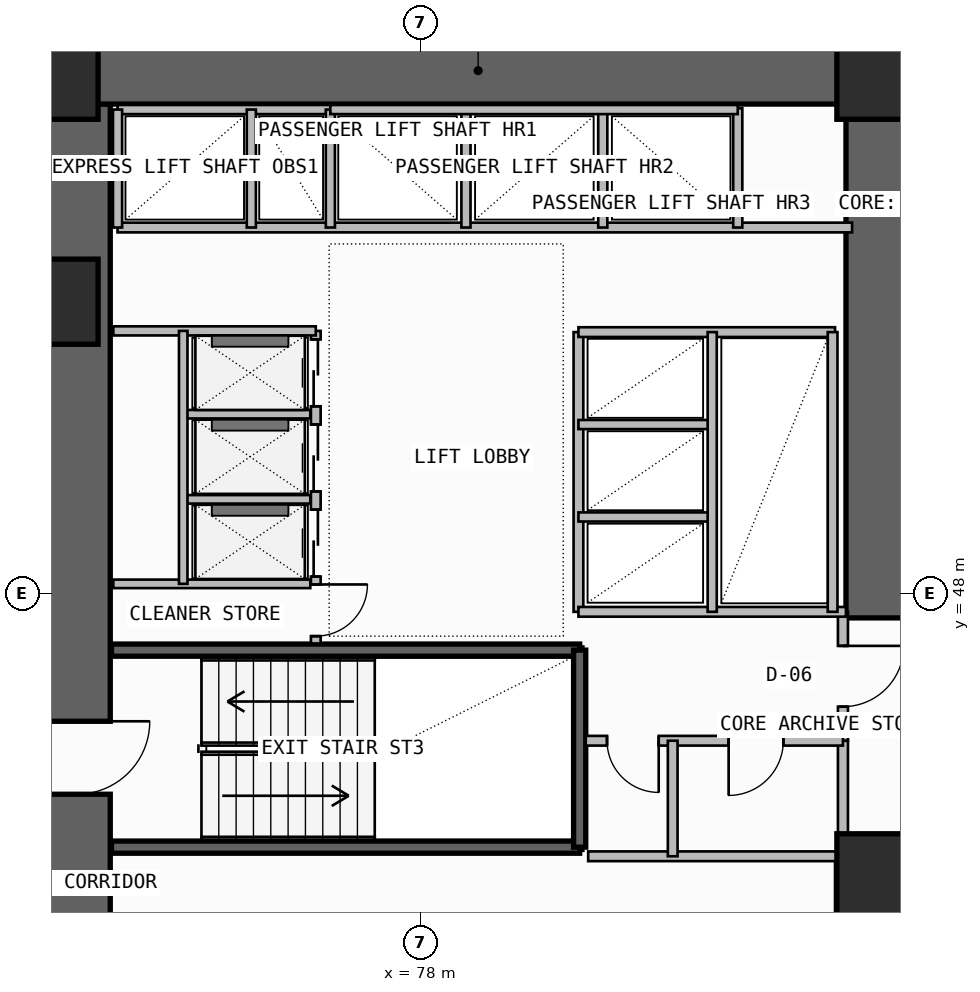
"""IFC4 building model, lengths in metres.
Left out: names, types, materials, properties, quantities, classifications, styles, units other than length and angle.
Written with IfcOpenShell. Run it as: python <this file> out.ifc"""

import sys

from ifc_helpers import new_model, si_unit, direction, frame, frame_2d, origin, origin_2d, place, context, subcontext, project, spatial, rectangle, extrude, element, fill, save


model = new_model("IFC4")
c1 = context("Model", 3, precision=1e-05, world=origin(), true_north=direction((0.0, 1.0)))
c2 = subcontext(c1, "Body", "Model", "MODEL_VIEW")
j1 = project(units=[si_unit("LENGTHUNIT", "METRE"), si_unit("PLANEANGLEUNIT", "RADIAN")], contexts=[c1])
p1 = place(None, origin())
s1 = spatial("IfcSite", under=j1, at=p1, CompositionType="ELEMENT")
p2 = place(p1, origin())
s2 = spatial("IfcBuilding", under=s1, at=p2, CompositionType="ELEMENT")
p3 = place(p2, frame((0.0, 0.0, 30.3)))
s3 = spatial("IfcBuildingStorey", under=s2, at=p3, CompositionType="ELEMENT", Elevation=30.3)
p4 = place(p3, frame((72.35, 35.5, -0.2), z_axis=(0.0, 0.0, 1.0), x_axis=(0.0, 1.0, 0.0)))
e1 = element("IfcWall", 1, at=p4, inside=s3, PredefinedType="SHEAR", context=c2, shape_type="SweptSolid", body=[
    extrude(rectangle(XDim=7.85, YDim=1.1, at=frame_2d((3.925, 0.0))), origin(), (0.0, 0.0, 1.0), 3.6),
])
p5 = place(p4, frame((1.45, 0.0, 0.2)))
e2 = element("IfcOpeningElement", 2, at=p5, cuts=e1, PredefinedType="OPENING", context=c2, shape_type="SweptSolid", body=[
    extrude(rectangle(XDim=1.2, YDim=2.2, at=frame_2d((0.6, 1.1))), frame((0.0, 0.56, 0.0), z_axis=(0.0, -1.0, 0.0), x_axis=(1.0, 0.0, 0.0)), (0.0, 0.0, 1.0), 1.12),
])
p6 = place(p3, frame((72.35, 43.35, -0.2), z_axis=(0.0, 0.0, 1.0), x_axis=(0.0, 1.0, 0.0)))
e3 = element("IfcWall", 3, at=p6, inside=s3, PredefinedType="SHEAR", context=c2, shape_type="SweptSolid", body=[
    extrude(rectangle(XDim=12.7, YDim=1.1, at=frame_2d((6.35, 0.0))), origin(), (0.0, 0.0, 1.0), 3.6),
])
p7 = place(p6, frame((1.35, 0.0, 0.2)))
e4 = element("IfcOpeningElement", 4, at=p7, cuts=e3, PredefinedType="OPENING", context=c2, shape_type="SweptSolid", body=[
    extrude(rectangle(XDim=1.2, YDim=2.2, at=frame_2d((0.6, 1.1))), frame((0.0, 0.56, 0.0), z_axis=(0.0, -1.0, 0.0), x_axis=(1.0, 0.0, 0.0)), (0.0, 0.0, 1.0), 1.12),
])
p8 = place(p3, frame((71.8, 56.6, -0.2), z_axis=(0.0, 0.0, 1.0), x_axis=(1.0, 0.0, 0.0)))
e5 = element("IfcWall", 5, at=p8, inside=s3, PredefinedType="SHEAR", context=c2, shape_type="SweptSolid", body=[
    extrude(rectangle(XDim=14.3, YDim=1.1, at=frame_2d((7.15, 0.0))), origin(), (0.0, 0.0, 1.0), 3.6),
])
p9 = place(p3, frame((85.55, 47.6, -0.2), z_axis=(0.0, 0.0, 1.0), x_axis=(0.0, 1.0, 0.0)))
e6 = element("IfcWall", 6, at=p9, inside=s3, PredefinedType="SHEAR", context=c2, shape_type="SweptSolid", body=[
    extrude(rectangle(XDim=8.45, YDim=1.1, at=frame_2d((4.225, 0.0))), origin(), (0.0, 0.0, 1.0), 3.6),
])
for number, where, z_axis, x_axis in (
    (7, (85.55, 43.35, 0.0), (0.0, 0.0, 1.0), (1.0, 0.0, 0.0)),
    (8, (72.0, 52.8, 0.0), (0.0, 0.0, 1.0), (1.0, 0.0, 0.0)),
    (9, (72.0, 56.5, 0.0), (0.0, 0.0, 1.0), (1.0, 0.0, 0.0)),
    (10, (85.55, 56.5, 0.0), (0.0, 0.0, 1.0), (1.0, 0.0, 0.0)),
):
    element("IfcColumn", number, at=place(p3, frame(where, z_axis=z_axis, x_axis=x_axis)), inside=s3, PredefinedType="COLUMN", context=c2, shape_type="SweptSolid", body=[
        extrude(rectangle(XDim=1.4, YDim=1.4, at=origin_2d()), origin(), (0.0, 0.0, 1.0), 3.6),
    ])
p10 = place(p3, frame((84.92, 38.85, 0.0), z_axis=(0.0, 0.0, 1.0), x_axis=(0.0, 1.0, 0.0)))
e11 = element("IfcWall", 11, at=p10, inside=s3, PredefinedType="SOLIDWALL", context=c2, shape_type="SweptSolid", body=[
    extrude(rectangle(XDim=4.83, YDim=0.2, at=frame_2d((2.415, 0.0))), origin(), (0.0, 0.0, 1.0), 3.4),
])
p11 = place(p10, frame((1.25, 0.0, 0.0)))
e12 = element("IfcOpeningElement", 12, at=p11, cuts=e11, PredefinedType="OPENING", context=c2, shape_type="SweptSolid", body=[
    extrude(rectangle(XDim=1.1, YDim=2.2, at=frame_2d((0.55, 1.1))), frame((0.0, 0.11, 0.0), z_axis=(0.0, -1.0, 0.0), x_axis=(1.0, 0.0, 0.0)), (0.0, 0.0, 1.0), 0.22),
])
for number, where, z_axis, x_axis in (
    (13, (72.92, 43.83, -0.2), (0.0, 0.0, 1.0), (1.0, 0.0, 0.0)),
    (14, (72.92, 47.07, -0.2), (0.0, 0.0, 1.0), (1.0, 0.0, 0.0)),
):
    element("IfcWall", number, at=place(p3, frame(where, z_axis=z_axis, x_axis=x_axis)), inside=s3, PredefinedType="SOLIDWALL", context=c2, shape_type="SweptSolid", body=[
        extrude(rectangle(XDim=7.7, YDim=0.2, at=frame_2d((3.85, 0.0))), origin(), (0.0, 0.0, 1.0), 3.6),
    ])
p12 = place(p3, frame((80.62, 43.83, -0.2), z_axis=(0.0, 0.0, 1.0), x_axis=(0.0, 1.0, 0.0)))
e15 = element("IfcWall", 15, at=p12, inside=s3, PredefinedType="SOLIDWALL", context=c2, shape_type="SweptSolid", body=[
    extrude(rectangle(XDim=3.24, YDim=0.2, at=frame_2d((1.62, 0.0))), origin(), (0.0, 0.0, 1.0), 3.6),
])
p13 = place(p3, frame((84.95, 43.68, 0.0), z_axis=(0.0, 0.0, 1.0), x_axis=(0.0, 1.0, 0.0)))
e16 = element("IfcWall", 16, at=p13, inside=s3, PredefinedType="PLUMBINGWALL", context=c2, shape_type="SweptSolid", body=[
    extrude(rectangle(XDim=1.9, YDim=0.165, at=frame_2d((0.95, 0.0))), origin(), (0.0, 0.0, 1.0), 3.4),
])
p14 = place(p3, frame((84.95, 45.58, 0.0), z_axis=(0.0, 0.0, 1.0), x_axis=(0.0, 1.0, 0.0)))
e17 = element("IfcWall", 17, at=p14, inside=s3, PredefinedType="PARTITIONING", context=c2, shape_type="SweptSolid", body=[
    extrude(rectangle(XDim=2.12, YDim=0.165, at=frame_2d((1.06, 0.0))), origin(), (0.0, 0.0, 1.0), 3.4),
])
p15 = place(p14, frame((0.56, 0.0, 0.0)))
e18 = element("IfcOpeningElement", 18, at=p15, cuts=e17, PredefinedType="OPENING", context=c2, shape_type="SweptSolid", body=[
    extrude(rectangle(XDim=1.0, YDim=2.2, at=frame_2d((0.5, 1.1))), frame((0.0, 0.093, 0.0), z_axis=(0.0, -1.0, 0.0), x_axis=(1.0, 0.0, 0.0)), (0.0, 0.0, 1.0), 0.185),
])
p16 = place(p3, frame((80.72, 45.58, 0.0), z_axis=(0.0, 0.0, 1.0), x_axis=(1.0, 0.0, 0.0)))
e19 = element("IfcWall", 19, at=p16, inside=s3, PredefinedType="PLUMBINGWALL", context=c2, shape_type="SweptSolid", body=[
    extrude(rectangle(XDim=4.23, YDim=0.16, at=frame_2d((2.115, 0.0))), origin(), (0.0, 0.0, 1.0), 3.4),
])
p17 = place(p16, frame((0.35, 0.0, 0.0)))
e20 = element("IfcOpeningElement", 20, at=p17, cuts=e19, PredefinedType="OPENING", context=c2, shape_type="SweptSolid", body=[
    extrude(rectangle(XDim=0.85, YDim=2.05, at=frame_2d((0.425, 1.025))), frame((0.0, 0.09, 0.0), z_axis=(0.0, -1.0, 0.0), x_axis=(1.0, 0.0, 0.0)), (0.0, 0.0, 1.0), 0.18),
])
p18 = place(p16, frame((2.35, 0.0, 0.0)))
e21 = element("IfcOpeningElement", 21, at=p18, cuts=e19, PredefinedType="OPENING", context=c2, shape_type="SweptSolid", body=[
    extrude(rectangle(XDim=0.9, YDim=2.1, at=frame_2d((0.45, 1.05))), frame((0.0, 0.09, 0.0), z_axis=(0.0, -1.0, 0.0), x_axis=(1.0, 0.0, 0.0)), (0.0, 0.0, 1.0), 0.18),
])
p19 = place(p3, frame((80.76, 43.68, 0.0), z_axis=(0.0, 0.0, 1.0), x_axis=(1.0, 0.0, 0.0)))
e22 = element("IfcWall", 22, at=p19, inside=s3, PredefinedType="PLUMBINGWALL", context=c2, shape_type="SweptSolid", body=[
    extrude(rectangle(XDim=4.19, YDim=0.16, at=frame_2d((2.095, 0.0))), origin(), (0.0, 0.0, 1.0), 3.4),
])
p20 = place(p3, frame((82.15, 43.68, 0.0), z_axis=(0.0, 0.0, 1.0), x_axis=(0.0, 1.0, 0.0)))
e23 = element("IfcWall", 23, at=p20, inside=s3, PredefinedType="PLUMBINGWALL", context=c2, shape_type="SweptSolid", body=[
    extrude(rectangle(XDim=1.9, YDim=0.16, at=frame_2d((0.95, 0.0))), origin(), (0.0, 0.0, 1.0), 3.4),
])
p21 = place(p3, frame((76.28, 47.18, 0.0), z_axis=(0.0, 0.0, 1.0), x_axis=(0.0, 1.0, 0.0)))
e24 = element("IfcWall", 24, at=p21, inside=s3, PredefinedType="SOLIDWALL", context=c2, shape_type="SweptSolid", body=[
    extrude(rectangle(XDim=5.14, YDim=0.16, at=frame_2d((2.57, 0.0))), origin(), (0.0, 0.0, 1.0), 3.4),
])
p22 = place(p21, frame((1.1, 0.0, 0.0)))
e25 = element("IfcOpeningElement", 25, at=p22, cuts=e24, PredefinedType="OPENING", context=c2, shape_type="SweptSolid", body=[
    extrude(rectangle(XDim=1.1, YDim=2.25, at=frame_2d((0.55, 1.125))), frame((0.0, 0.09, 0.0), z_axis=(0.0, -1.0, 0.0), x_axis=(1.0, 0.0, 0.0)), (0.0, 0.0, 1.0), 0.18),
])
p23 = place(p21, frame((2.5, 0.0, 0.0)))
e26 = element("IfcOpeningElement", 26, at=p23, cuts=e24, PredefinedType="OPENING", context=c2, shape_type="SweptSolid", body=[
    extrude(rectangle(XDim=1.1, YDim=2.25, at=frame_2d((0.55, 1.125))), frame((0.0, 0.09, 0.0), z_axis=(0.0, -1.0, 0.0), x_axis=(1.0, 0.0, 0.0)), (0.0, 0.0, 1.0), 0.18),
])
p24 = place(p21, frame((3.9, 0.0, 0.0)))
e27 = element("IfcOpeningElement", 27, at=p24, cuts=e24, PredefinedType="OPENING", context=c2, shape_type="SweptSolid", body=[
    extrude(rectangle(XDim=1.1, YDim=2.25, at=frame_2d((0.55, 1.125))), frame((0.0, 0.09, 0.0), z_axis=(0.0, -1.0, 0.0), x_axis=(1.0, 0.0, 0.0)), (0.0, 0.0, 1.0), 0.18),
])
p25 = place(p21, frame((0.12, 0.0, 0.0)))
e28 = element("IfcOpeningElement", 28, at=p25, cuts=e24, PredefinedType="OPENING", context=c2, shape_type="SweptSolid", body=[
    extrude(rectangle(XDim=0.85, YDim=2.05, at=frame_2d((0.425, 1.025))), frame((0.0, 0.09, 0.0), z_axis=(0.0, -1.0, 0.0), x_axis=(1.0, 0.0, 0.0)), (0.0, 0.0, 1.0), 0.18),
])
p26 = place(p3, frame((72.95, 52.32, 0.0), z_axis=(0.0, 0.0, 1.0), x_axis=(1.0, 0.0, 0.0)))
e29 = element("IfcWall", 29, at=p26, inside=s3, PredefinedType="SOLIDWALL", context=c2, shape_type="SweptSolid", body=[
    extrude(rectangle(XDim=3.33, YDim=0.15, at=frame_2d((1.665, 0.0))), origin(), (0.0, 0.0, 1.0), 3.4),
])
p27 = place(p3, frame((72.95, 48.16, 0.0), z_axis=(0.0, 0.0, 1.0), x_axis=(1.0, 0.0, 0.0)))
e30 = element("IfcWall", 30, at=p27, inside=s3, PredefinedType="PLUMBINGWALL", context=c2, shape_type="SweptSolid", body=[
    extrude(rectangle(XDim=3.24, YDim=0.14, at=frame_2d((1.62, 0.0))), origin(), (0.0, 0.0, 1.0), 3.4),
])
for number, where, z_axis, x_axis in (
    (31, (74.15, 49.55, 0.0), (0.0, 0.0, 1.0), (1.0, 0.0, 0.0)),
    (32, (74.15, 50.95, 0.0), (0.0, 0.0, 1.0), (1.0, 0.0, 0.0)),
):
    element("IfcWall", number, at=place(p3, frame(where, z_axis=z_axis, x_axis=x_axis)), inside=s3, PredefinedType="PLUMBINGWALL", context=c2, shape_type="SweptSolid", body=[
        extrude(rectangle(XDim=2.04, YDim=0.14, at=frame_2d((1.02, 0.0))), origin(), (0.0, 0.0, 1.0), 3.4),
    ])
p28 = place(p3, frame((74.1, 48.16, 0.0), z_axis=(0.0, 0.0, 1.0), x_axis=(0.0, 1.0, 0.0)))
e33 = element("IfcWall", 33, at=p28, inside=s3, PredefinedType="PLUMBINGWALL", context=c2, shape_type="SweptSolid", body=[
    extrude(rectangle(XDim=4.16, YDim=0.14, at=frame_2d((2.08, 0.0))), origin(), (0.0, 0.0, 1.0), 3.4),
])
p29 = place(p3, frame((80.6, 47.7, 0.0), z_axis=(0.0, 0.0, 1.0), x_axis=(0.0, 1.0, 0.0)))
e34 = element("IfcWall", 34, at=p29, inside=s3, PredefinedType="SOLIDWALL", context=c2, shape_type="SweptSolid", body=[
    extrude(rectangle(XDim=4.6, YDim=0.16, at=frame_2d((2.3, 0.0))), origin(), (0.0, 0.0, 1.0), 3.4),
])
p30 = place(p3, frame((80.6, 47.7, 0.0), z_axis=(0.0, 0.0, 1.0), x_axis=(1.0, 0.0, 0.0)))
e35 = element("IfcWall", 35, at=p30, inside=s3, PredefinedType="SOLIDWALL", context=c2, shape_type="SweptSolid", body=[
    extrude(rectangle(XDim=4.4, YDim=0.16, at=frame_2d((2.2, 0.0))), origin(), (0.0, 0.0, 1.0), 3.4),
])
p31 = place(p3, frame((80.6, 52.3, 0.0), z_axis=(0.0, 0.0, 1.0), x_axis=(1.0, 0.0, 0.0)))
e36 = element("IfcWall", 36, at=p31, inside=s3, PredefinedType="SOLIDWALL", context=c2, shape_type="SweptSolid", body=[
    extrude(rectangle(XDim=4.22, YDim=0.16, at=frame_2d((2.11, 0.0))), origin(), (0.0, 0.0, 1.0), 3.4),
])
for number, where, z_axis, x_axis in (
    (37, (80.6, 49.26, 0.0), (0.0, 0.0, 1.0), (1.0, 0.0, 0.0)),
    (38, (80.6, 50.78, 0.0), (0.0, 0.0, 1.0), (1.0, 0.0, 0.0)),
):
    element("IfcWall", number, at=place(p3, frame(where, z_axis=z_axis, x_axis=x_axis)), inside=s3, PredefinedType="PLUMBINGWALL", context=c2, shape_type="SweptSolid", body=[
        extrude(rectangle(XDim=2.2, YDim=0.15, at=frame_2d((1.1, 0.0))), origin(), (0.0, 0.0, 1.0), 3.4),
    ])
p32 = place(p3, frame((82.8, 47.7, 0.0), z_axis=(0.0, 0.0, 1.0), x_axis=(0.0, 1.0, 0.0)))
e39 = element("IfcWall", 39, at=p32, inside=s3, PredefinedType="PLUMBINGWALL", context=c2, shape_type="SweptSolid", body=[
    extrude(rectangle(XDim=4.6, YDim=0.15, at=frame_2d((2.3, 0.0))), origin(), (0.0, 0.0, 1.0), 3.4),
])
p33 = place(p3, frame((84.78, 47.7, 0.0), z_axis=(0.0, 0.0, 1.0), x_axis=(0.0, 1.0, 0.0)))
e40 = element("IfcWall", 40, at=p33, inside=s3, PredefinedType="SOLIDWALL", context=c2, shape_type="SweptSolid", body=[
    extrude(rectangle(XDim=4.6, YDim=0.16, at=frame_2d((2.3, 0.0))), origin(), (0.0, 0.0, 1.0), 3.4),
])
p34 = place(p3, frame((73.02, 54.02, 0.0), z_axis=(0.0, 0.0, 1.0), x_axis=(1.0, 0.0, 0.0)))
e41 = element("IfcWall", 41, at=p34, inside=s3, PredefinedType="SOLIDWALL", context=c2, shape_type="SweptSolid", body=[
    extrude(rectangle(XDim=12.08, YDim=0.16, at=frame_2d((6.04, 0.0))), origin(), (0.0, 0.0, 1.0), 3.4),
])
p35 = place(p3, frame((73.02, 55.96, 0.0), z_axis=(0.0, 0.0, 1.0), x_axis=(1.0, 0.0, 0.0)))
e42 = element("IfcWall", 42, at=p35, inside=s3, PredefinedType="SOLIDWALL", context=c2, shape_type="SweptSolid", body=[
    extrude(rectangle(XDim=3.5, YDim=0.15, at=frame_2d((1.75, 0.0))), origin(), (0.0, 0.0, 1.0), 3.4),
])
p36 = place(p3, frame((73.02, 54.02, 0.0), z_axis=(0.0, 0.0, 1.0), x_axis=(0.0, 1.0, 0.0)))
e43 = element("IfcWall", 43, at=p36, inside=s3, PredefinedType="PLUMBINGWALL", context=c2, shape_type="SweptSolid", body=[
    extrude(rectangle(XDim=1.94, YDim=0.15, at=frame_2d((0.97, 0.0))), origin(), (0.0, 0.0, 1.0), 3.4),
])
p37 = place(p3, frame((76.52, 54.02, 0.0), z_axis=(0.0, 0.0, 1.0), x_axis=(0.0, 1.0, 0.0)))
e44 = element("IfcWall", 44, at=p37, inside=s3, PredefinedType="SOLIDWALL", context=c2, shape_type="SweptSolid", body=[
    extrude(rectangle(XDim=1.94, YDim=0.15, at=frame_2d((0.97, 0.0))), origin(), (0.0, 0.0, 1.0), 3.4),
])
p38 = place(p3, frame((75.22, 54.02, 0.0), z_axis=(0.0, 0.0, 1.0), x_axis=(0.0, 1.0, 0.0)))
e45 = element("IfcWall", 45, at=p38, inside=s3, PredefinedType="PLUMBINGWALL", context=c2, shape_type="SweptSolid", body=[
    extrude(rectangle(XDim=1.94, YDim=0.15, at=frame_2d((0.97, 0.0))), origin(), (0.0, 0.0, 1.0), 3.4),
])
for number, where, z_axis, x_axis in (
    (46, (78.75, 54.02, 0.0), (0.0, 0.0, 1.0), (0.0, 1.0, 0.0)),
    (47, (81.0, 54.02, 0.0), (0.0, 0.0, 1.0), (0.0, 1.0, 0.0)),
):
    element("IfcWall", number, at=place(p3, frame(where, z_axis=z_axis, x_axis=x_axis)), inside=s3, PredefinedType="PLUMBINGWALL", context=c2, shape_type="SweptSolid", body=[
        extrude(rectangle(XDim=1.96, YDim=0.15, at=frame_2d((0.98, 0.0))), origin(), (0.0, 0.0, 1.0), 3.4),
    ])
p39 = place(p3, frame((83.22, 54.02, 0.0), z_axis=(0.0, 0.0, 1.0), x_axis=(0.0, 1.0, 0.0)))
e48 = element("IfcWall", 48, at=p39, inside=s3, PredefinedType="SOLIDWALL", context=c2, shape_type="SweptSolid", body=[
    extrude(rectangle(XDim=1.96, YDim=0.15, at=frame_2d((0.98, 0.0))), origin(), (0.0, 0.0, 1.0), 3.4),
])
p40 = place(p3, frame((76.52, 55.96, 0.0), z_axis=(0.0, 0.0, 1.0), x_axis=(1.0, 0.0, 0.0)))
e49 = element("IfcWall", 49, at=p40, inside=s3, PredefinedType="SOLIDWALL", context=c2, shape_type="SweptSolid", body=[
    extrude(rectangle(XDim=6.7, YDim=0.15, at=frame_2d((3.35, 0.0))), origin(), (0.0, 0.0, 1.0), 3.4),
])
p41 = place(p7, frame((1.2, 0.0, 0.0), z_axis=(0.0, 0.0, 1.0), x_axis=(-1.0, 0.0, 0.0)))
e50 = element("IfcDoor", 50, at=p41, inside=s3, OperationType="SINGLE_SWING_LEFT", PredefinedType="USERDEFINED", context=c2, shape_type="SweptSolid", body=[
    extrude(rectangle(XDim=1.2, YDim=2.2, at=frame_2d((0.6, 1.1))), frame((0.0, 0.025, 0.0), z_axis=(0.0, -1.0, 0.0), x_axis=(1.0, 0.0, 0.0)), (0.0, 0.0, 1.0), 0.05),
])
fill(e4, e50)
p42 = place(p15, frame((1.0, 0.0, 0.0), z_axis=(0.0, 0.0, 1.0), x_axis=(-1.0, 0.0, 0.0)))
e51 = element("IfcDoor", 51, at=p42, inside=s3, OperationType="SINGLE_SWING_LEFT", PredefinedType="DOOR", context=c2, shape_type="SweptSolid", body=[
    extrude(rectangle(XDim=1.0, YDim=2.2, at=frame_2d((0.5, 1.1))), frame((0.0, 0.025, 0.0), z_axis=(0.0, -1.0, 0.0), x_axis=(1.0, 0.0, 0.0)), (0.0, 0.0, 1.0), 0.05),
])
fill(e18, e51)
p43 = place(p17, frame((0.85, 0.0, 0.0), z_axis=(0.0, 0.0, 1.0), x_axis=(-1.0, 0.0, 0.0)))
e52 = element("IfcDoor", 52, at=p43, inside=s3, OperationType="SINGLE_SWING_LEFT", PredefinedType="DOOR", context=c2, shape_type="SweptSolid", body=[
    extrude(rectangle(XDim=0.85, YDim=2.05, at=frame_2d((0.425, 1.025))), frame((0.0, 0.025, 0.0), z_axis=(0.0, -1.0, 0.0), x_axis=(1.0, 0.0, 0.0)), (0.0, 0.0, 1.0), 0.05),
])
fill(e20, e52)
p44 = place(p18, frame((0.9, 0.0, 0.0), z_axis=(0.0, 0.0, 1.0), x_axis=(-1.0, 0.0, 0.0)))
e53 = element("IfcDoor", 53, at=p44, inside=s3, OperationType="SINGLE_SWING_RIGHT", PredefinedType="DOOR", context=c2, shape_type="SweptSolid", body=[
    extrude(rectangle(XDim=0.9, YDim=2.1, at=frame_2d((0.45, 1.05))), frame((0.0, 0.025, 0.0), z_axis=(0.0, -1.0, 0.0), x_axis=(1.0, 0.0, 0.0)), (0.0, 0.0, 1.0), 0.05),
])
fill(e21, e53)
p45 = place(p22, origin())
e54 = element("IfcDoor", 54, at=p45, inside=s3, OperationType="DOUBLE_DOOR_SLIDING", PredefinedType="DOOR", context=c2, shape_type="SweptSolid", body=[
    extrude(rectangle(XDim=1.1, YDim=2.25, at=frame_2d((0.55, 1.125))), frame((0.0, 0.025, 0.0), z_axis=(0.0, -1.0, 0.0), x_axis=(1.0, 0.0, 0.0)), (0.0, 0.0, 1.0), 0.05),
])
fill(e25, e54)
p46 = place(p23, origin())
e55 = element("IfcDoor", 55, at=p46, inside=s3, OperationType="DOUBLE_DOOR_SLIDING", PredefinedType="DOOR", context=c2, shape_type="SweptSolid", body=[
    extrude(rectangle(XDim=1.1, YDim=2.25, at=frame_2d((0.55, 1.125))), frame((0.0, 0.025, 0.0), z_axis=(0.0, -1.0, 0.0), x_axis=(1.0, 0.0, 0.0)), (0.0, 0.0, 1.0), 0.05),
])
fill(e26, e55)
p47 = place(p24, origin())
e56 = element("IfcDoor", 56, at=p47, inside=s3, OperationType="DOUBLE_DOOR_SLIDING", PredefinedType="DOOR", context=c2, shape_type="SweptSolid", body=[
    extrude(rectangle(XDim=1.1, YDim=2.25, at=frame_2d((0.55, 1.125))), frame((0.0, 0.025, 0.0), z_axis=(0.0, -1.0, 0.0), x_axis=(1.0, 0.0, 0.0)), (0.0, 0.0, 1.0), 0.05),
])
fill(e27, e56)
p48 = place(p25, frame((0.85, 0.0, 0.0), z_axis=(0.0, 0.0, 1.0), x_axis=(-1.0, 0.0, 0.0)))
e57 = element("IfcDoor", 57, at=p48, inside=s3, OperationType="SINGLE_SWING_LEFT", PredefinedType="DOOR", context=c2, shape_type="SweptSolid", body=[
    extrude(rectangle(XDim=0.85, YDim=2.05, at=frame_2d((0.425, 1.025))), frame((0.0, 0.025, 0.0), z_axis=(0.0, -1.0, 0.0), x_axis=(1.0, 0.0, 0.0)), (0.0, 0.0, 1.0), 0.05),
])
fill(e28, e57)
save(model, sys.argv[1])
